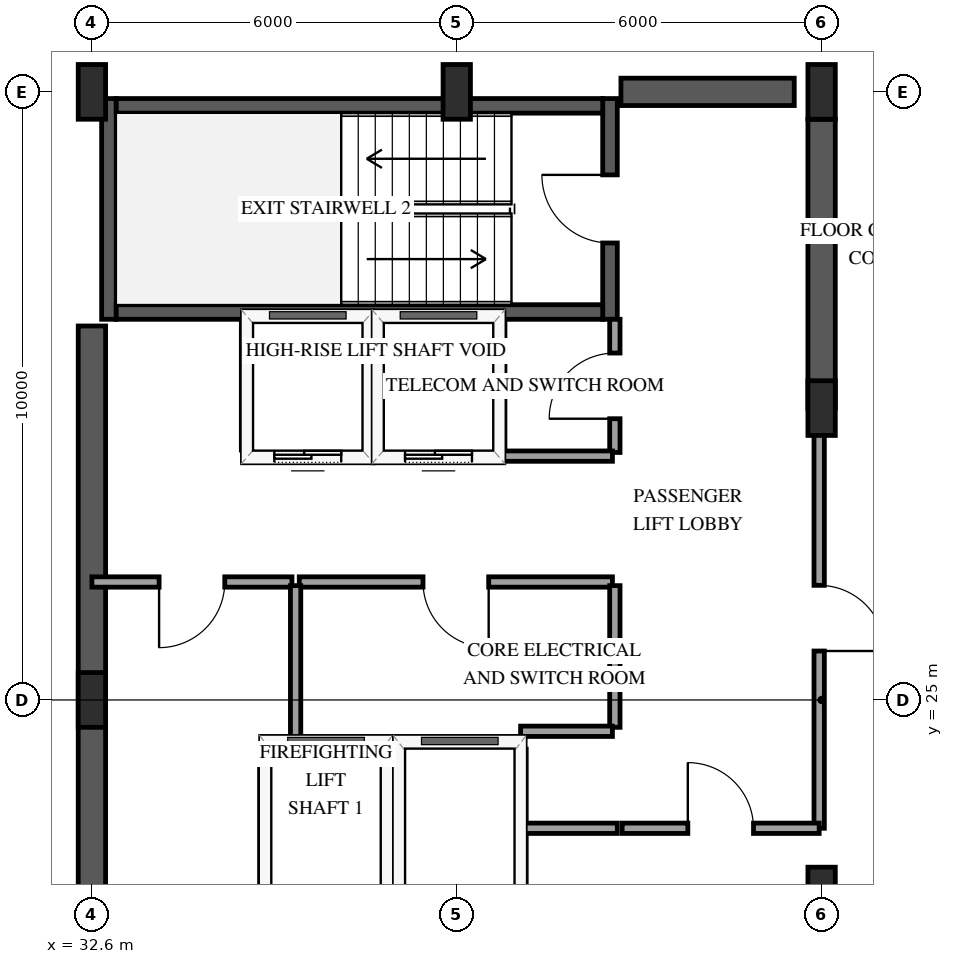
"""IFC4 building model, lengths in metres.
Left out: names, types, materials, properties, quantities, classifications, styles, units other than length and angle.
Written with IfcOpenShell. Run it as: python <this file> out.ifc"""

import sys

from ifc_helpers import new_model, si_unit, direction, frame, frame_2d, origin, origin_2d, place, context, subcontext, project, spatial, rectangle, extrude, element, fill, save


model = new_model("IFC4")
c1 = context("Model", 3, precision=1e-05, world=origin(), true_north=direction((0.0, 1.0)))
c2 = subcontext(c1, "Body", "Model", "MODEL_VIEW")
j1 = project(units=[si_unit("LENGTHUNIT", "METRE"), si_unit("PLANEANGLEUNIT", "RADIAN")], contexts=[c1])
p1 = place(None, origin())
s1 = spatial("IfcSite", under=j1, at=p1, CompositionType="ELEMENT")
p2 = place(p1, origin())
s2 = spatial("IfcBuilding", under=s1, at=p2, CompositionType="ELEMENT")
p3 = place(p2, frame((0.0, 0.0, 246.25)))
s3 = spatial("IfcBuildingStorey", under=s2, at=p3, CompositionType="ELEMENT", Elevation=246.25)
p4 = place(p3, frame((32.88, 31.26, 0.0), z_axis=(0.0, 0.0, 1.0), x_axis=(0.0, 1.0, 0.0)))
e1 = element("IfcWall", 1, at=p4, inside=s3, PredefinedType="SHEAR", context=c2, shape_type="SweptSolid", body=[
    extrude(rectangle(XDim=3.63, YDim=0.24, at=frame_2d((1.815, 0.0))), origin(), (0.0, 0.0, 1.0), 3.75),
])
p5 = place(p3, frame((41.12, 31.26, 0.0), z_axis=(0.0, 0.0, 1.0), x_axis=(0.0, 1.0, 0.0)))
e2 = element("IfcWall", 2, at=p5, inside=s3, PredefinedType="SHEAR", context=c2, shape_type="SweptSolid", body=[
    extrude(rectangle(XDim=3.63, YDim=0.24, at=frame_2d((1.815, 0.0))), origin(), (0.0, 0.0, 1.0), 3.75),
])
p6 = place(p5, frame((1.255, 0.0, 0.0)))
e3 = element("IfcOpeningElement", 3, at=p6, cuts=e2, PredefinedType="OPENING", context=c2, shape_type="SweptSolid", body=[
    extrude(rectangle(XDim=1.12, YDim=2.15, at=frame_2d((0.56, 1.075))), frame((0.0, 0.13, 0.0), z_axis=(0.0, -1.0, 0.0), x_axis=(1.0, 0.0, 0.0)), (0.0, 0.0, 1.0), 0.26),
])
for number, where, z_axis, x_axis in (
    (4, (33.0, 31.38, 0.0), (0.0, 0.0, 1.0), (1.0, 0.0, 0.0)),
    (5, (33.0, 34.77, 0.0), (0.0, 0.0, 1.0), (1.0, 0.0, 0.0)),
):
    element("IfcWall", number, at=place(p3, frame(where, z_axis=z_axis, x_axis=x_axis)), inside=s3, PredefinedType="SHEAR", context=c2, shape_type="SweptSolid", body=[
        extrude(rectangle(XDim=8.0, YDim=0.24, at=frame_2d((4.0, 0.0))), origin(), (0.0, 0.0, 1.0), 3.75),
    ])
p7 = place(p3, frame((32.6, 18.85, 0.0), z_axis=(0.0, 0.0, 1.0), x_axis=(0.0, 1.0, 0.0)))
e6 = element("IfcWall", 6, at=p7, inside=s3, PredefinedType="SHEAR", context=c2, shape_type="SweptSolid", body=[
    extrude(rectangle(XDim=12.3, YDim=0.45, at=frame_2d((6.15, 0.0))), origin(), (0.0, 0.0, 1.0), 3.75),
])
p8 = place(p3, frame((41.3, 35.0, 0.0), z_axis=(0.0, 0.0, 1.0), x_axis=(1.0, 0.0, 0.0)))
e7 = element("IfcWall", 7, at=p8, inside=s3, PredefinedType="SHEAR", context=c2, shape_type="SweptSolid", body=[
    extrude(rectangle(XDim=2.85, YDim=0.45, at=frame_2d((1.425, 0.0))), origin(), (0.0, 0.0, 1.0), 3.75),
])
p9 = place(p3, frame((44.6, 29.8, 0.0), z_axis=(0.0, 0.0, 1.0), x_axis=(0.0, 1.0, 0.0)))
e8 = element("IfcWall", 8, at=p9, inside=s3, PredefinedType="SHEAR", context=c2, shape_type="SweptSolid", body=[
    extrude(rectangle(XDim=4.75, YDim=0.45, at=frame_2d((2.375, 0.0))), origin(), (0.0, 0.0, 1.0), 3.75),
])
for number, where, z_axis, x_axis in (
    (9, (32.6, 25.0, 0.0), (0.0, 0.0, 1.0), (1.0, 0.0, 0.0)),
    (10, (32.6, 35.0, 0.0), (0.0, 0.0, 1.0), (1.0, 0.0, 0.0)),
    (11, (38.6, 35.0, 0.0), (0.0, 0.0, 1.0), (1.0, 0.0, 0.0)),
    (12, (44.6, 21.8, 0.0), (0.0, 0.0, 1.0), (1.0, 0.0, 0.0)),
    (13, (44.6, 29.8, 0.0), (0.0, 0.0, 1.0), (1.0, 0.0, 0.0)),
    (14, (44.6, 35.0, 0.0), (0.0, 0.0, 1.0), (1.0, 0.0, 0.0)),
):
    element("IfcColumn", number, at=place(p3, frame(where, z_axis=z_axis, x_axis=x_axis)), inside=s3, PredefinedType="PILASTER", context=c2, shape_type="SweptSolid", body=[
        extrude(rectangle(XDim=0.45, YDim=0.9, at=origin_2d()), origin(), (0.0, 0.0, 1.0), 3.75),
    ])
p10 = place(p3, frame((35.45, 24.3, 0.0), z_axis=(0.0, 0.0, 1.0), x_axis=(1.0, 0.0, 0.0)))
e15 = element("IfcWall", 15, at=p10, inside=s3, PredefinedType="SOLIDWALL", context=c2, shape_type="SweptSolid", body=[
    extrude(rectangle(XDim=2.0, YDim=0.185, at=frame_2d((1.0, 0.0))), origin(), (0.0, 0.0, 1.0), 3.45),
])
for number, where, z_axis, x_axis in (
    (16, (35.45, 21.81, 0.0), (0.0, 0.0, 1.0), (0.0, 1.0, 0.0)),
    (17, (37.45, 21.81, 0.0), (0.0, 0.0, 1.0), (0.0, 1.0, 0.0)),
):
    element("IfcWall", number, at=place(p3, frame(where, z_axis=z_axis, x_axis=x_axis)), inside=s3, PredefinedType="SOLIDWALL", context=c2, shape_type="SweptSolid", body=[
        extrude(rectangle(XDim=2.38, YDim=0.185, at=frame_2d((1.19, 0.0))), origin(), (0.0, 0.0, 1.0), 3.45),
    ])
p11 = place(p3, frame((37.65, 24.3, 0.0), z_axis=(0.0, 0.0, 1.0), x_axis=(1.0, 0.0, 0.0)))
e18 = element("IfcWall", 18, at=p11, inside=s3, PredefinedType="SOLIDWALL", context=c2, shape_type="SweptSolid", body=[
    extrude(rectangle(XDim=2.0, YDim=0.185, at=frame_2d((1.0, 0.0))), origin(), (0.0, 0.0, 1.0), 3.45),
])
p12 = place(p3, frame((39.65, 21.81, 0.0), z_axis=(0.0, 0.0, 1.0), x_axis=(0.0, 1.0, 0.0)))
e19 = element("IfcWall", 19, at=p12, inside=s3, PredefinedType="SOLIDWALL", context=c2, shape_type="SweptSolid", body=[
    extrude(rectangle(XDim=2.38, YDim=0.185, at=frame_2d((1.19, 0.0))), origin(), (0.0, 0.0, 1.0), 3.45),
])
p13 = place(p3, frame((35.15, 29.0, 0.0), z_axis=(0.0, 0.0, 1.0), x_axis=(1.0, 0.0, 0.0)))
e20 = element("IfcWall", 20, at=p13, inside=s3, PredefinedType="SOLIDWALL", context=c2, shape_type="SweptSolid", body=[
    extrude(rectangle(XDim=2.0, YDim=0.185, at=frame_2d((1.0, 0.0))), origin(), (0.0, 0.0, 1.0), 3.45),
])
p14 = place(p13, frame((0.45, 0.0, 0.0)))
e21 = element("IfcOpeningElement", 21, at=p14, cuts=e20, PredefinedType="OPENING", context=c2, shape_type="SweptSolid", body=[
    extrude(rectangle(XDim=1.1, YDim=2.15, at=frame_2d((0.55, 1.075))), frame((0.0, 0.103, 0.0), z_axis=(0.0, -1.0, 0.0), x_axis=(1.0, 0.0, 0.0)), (0.0, 0.0, 1.0), 0.205),
])
for number, where, z_axis, x_axis in (
    (22, (35.15, 29.11, 0.0), (0.0, 0.0, 1.0), (0.0, 1.0, 0.0)),
    (23, (37.15, 29.11, 0.0), (0.0, 0.0, 1.0), (0.0, 1.0, 0.0)),
):
    element("IfcWall", number, at=place(p3, frame(where, z_axis=z_axis, x_axis=x_axis)), inside=s3, PredefinedType="SOLIDWALL", context=c2, shape_type="SweptSolid", body=[
        extrude(rectangle(XDim=2.1, YDim=0.185, at=frame_2d((1.05, 0.0))), origin(), (0.0, 0.0, 1.0), 3.45),
    ])
p15 = place(p3, frame((37.3, 29.0, 0.0), z_axis=(0.0, 0.0, 1.0), x_axis=(1.0, 0.0, 0.0)))
e24 = element("IfcWall", 24, at=p15, inside=s3, PredefinedType="SOLIDWALL", context=c2, shape_type="SweptSolid", body=[
    extrude(rectangle(XDim=2.0, YDim=0.185, at=frame_2d((1.0, 0.0))), origin(), (0.0, 0.0, 1.0), 3.45),
])
p16 = place(p15, frame((0.45, 0.0, 0.0)))
e25 = element("IfcOpeningElement", 25, at=p16, cuts=e24, PredefinedType="OPENING", context=c2, shape_type="SweptSolid", body=[
    extrude(rectangle(XDim=1.1, YDim=2.15, at=frame_2d((0.55, 1.075))), frame((0.0, 0.103, 0.0), z_axis=(0.0, -1.0, 0.0), x_axis=(1.0, 0.0, 0.0)), (0.0, 0.0, 1.0), 0.205),
])
p17 = place(p3, frame((39.3, 29.11, 0.0), z_axis=(0.0, 0.0, 1.0), x_axis=(0.0, 1.0, 0.0)))
e26 = element("IfcWall", 26, at=p17, inside=s3, PredefinedType="SOLIDWALL", context=c2, shape_type="SweptSolid", body=[
    extrude(rectangle(XDim=2.1, YDim=0.185, at=frame_2d((1.05, 0.0))), origin(), (0.0, 0.0, 1.0), 3.45),
])
p18 = place(p3, frame((44.56, 29.8, 0.0), z_axis=(0.0, 0.0, 1.0), x_axis=(0.0, -1.0, 0.0)))
e27 = element("IfcWall", 27, at=p18, inside=s3, PredefinedType="PARTITIONING", context=c2, shape_type="SweptSolid", body=[
    extrude(rectangle(XDim=6.91, YDim=0.17, at=frame_2d((3.455, 0.0))), origin(), (0.0, 0.0, 1.0), 2.49),
])
p19 = place(p18, frame((2.915, 0.0, 0.0)))
e28 = element("IfcOpeningElement", 28, at=p19, cuts=e27, PredefinedType="OPENING", context=c2, shape_type="SweptSolid", body=[
    extrude(rectangle(XDim=1.08, YDim=2.15, at=frame_2d((0.54, 1.075))), frame((0.0, 0.095, 0.0), z_axis=(0.0, -1.0, 0.0), x_axis=(1.0, 0.0, 0.0)), (0.0, 0.0, 1.0), 0.19),
])
p20 = place(p3, frame((41.16, 26.94, 0.0), z_axis=(0.0, 0.0, 1.0), x_axis=(-1.0, 0.0, 0.0)))
e29 = element("IfcWall", 29, at=p20, inside=s3, PredefinedType="PARTITIONING", context=c2, shape_type="SweptSolid", body=[
    extrude(rectangle(XDim=5.15, YDim=0.17, at=frame_2d((2.575, 0.0))), origin(), (0.0, 0.0, 1.0), 3.45),
])
p21 = place(p20, frame((2.035, 0.0, 0.0)))
e30 = element("IfcOpeningElement", 30, at=p21, cuts=e29, PredefinedType="OPENING", context=c2, shape_type="SweptSolid", body=[
    extrude(rectangle(XDim=1.08, YDim=2.15, at=frame_2d((0.54, 1.075))), frame((0.0, 0.095, 0.0), z_axis=(0.0, -1.0, 0.0), x_axis=(1.0, 0.0, 0.0)), (0.0, 0.0, 1.0), 0.19),
])
p22 = place(p3, frame((35.89, 26.94, 0.0), z_axis=(0.0, 0.0, 1.0), x_axis=(-1.0, 0.0, 0.0)))
e31 = element("IfcWall", 31, at=p22, inside=s3, PredefinedType="PARTITIONING", context=c2, shape_type="SweptSolid", body=[
    extrude(rectangle(XDim=3.29, YDim=0.17, at=frame_2d((1.645, 0.0))), origin(), (0.0, 0.0, 1.0), 3.45),
])
p23 = place(p22, frame((1.105, 0.0, 0.0)))
e32 = element("IfcOpeningElement", 32, at=p23, cuts=e31, PredefinedType="OPENING", context=c2, shape_type="SweptSolid", body=[
    extrude(rectangle(XDim=1.08, YDim=2.15, at=frame_2d((0.54, 1.075))), frame((0.0, 0.095, 0.0), z_axis=(0.0, -1.0, 0.0), x_axis=(1.0, 0.0, 0.0)), (0.0, 0.0, 1.0), 0.19),
])
p24 = place(p3, frame((41.32, 22.89, 0.0), z_axis=(0.0, 0.0, 1.0), x_axis=(1.0, 0.0, 0.0)))
e33 = element("IfcWall", 33, at=p24, inside=s3, PredefinedType="PARTITIONING", context=c2, shape_type="SweptSolid", body=[
    extrude(rectangle(XDim=3.24, YDim=0.17, at=frame_2d((1.62, 0.0))), origin(), (0.0, 0.0, 1.0), 3.45),
])
p25 = place(p24, frame((1.08, 0.0, 0.0)))
e34 = element("IfcOpeningElement", 34, at=p25, cuts=e33, PredefinedType="OPENING", context=c2, shape_type="SweptSolid", body=[
    extrude(rectangle(XDim=1.08, YDim=2.15, at=frame_2d((0.54, 1.075))), frame((0.0, 0.095, 0.0), z_axis=(0.0, -1.0, 0.0), x_axis=(1.0, 0.0, 0.0)), (0.0, 0.0, 1.0), 0.19),
])
p26 = place(p3, frame((35.95, 26.88, 0.0), z_axis=(0.0, 0.0, 1.0), x_axis=(0.0, -1.0, 0.0)))
e35 = element("IfcWall", 35, at=p26, inside=s3, PredefinedType="PARTITIONING", context=c2, shape_type="SweptSolid", body=[
    extrude(rectangle(XDim=2.58, YDim=0.17, at=frame_2d((1.29, 0.0))), origin(), (0.0, 0.0, 1.0), 3.45),
])
p27 = place(p3, frame((41.2, 24.55, 0.0), z_axis=(0.0, 0.0, 1.0), x_axis=(0.0, 1.0, 0.0)))
e36 = element("IfcWall", 36, at=p27, inside=s3, PredefinedType="PARTITIONING", context=c2, shape_type="SweptSolid", body=[
    extrude(rectangle(XDim=2.33, YDim=0.17, at=frame_2d((1.165, 0.0))), origin(), (0.0, 0.0, 1.0), 3.45),
])
p28 = place(p3, frame((41.2, 29.07, 0.0), z_axis=(0.0, 0.0, 1.0), x_axis=(0.0, 1.0, 0.0)))
e37 = element("IfcWall", 37, at=p28, inside=s3, PredefinedType="PARTITIONING", context=c2, shape_type="SweptSolid", body=[
    extrude(rectangle(XDim=2.19, YDim=0.17, at=frame_2d((1.095, 0.0))), origin(), (0.0, 0.0, 1.0), 3.45),
])
p29 = place(p28, frame((0.555, 0.0, 0.0)))
e38 = element("IfcOpeningElement", 38, at=p29, cuts=e37, PredefinedType="OPENING", context=c2, shape_type="SweptSolid", body=[
    extrude(rectangle(XDim=1.08, YDim=2.15, at=frame_2d((0.54, 1.075))), frame((0.0, 0.095, 0.0), z_axis=(0.0, -1.0, 0.0), x_axis=(1.0, 0.0, 0.0)), (0.0, 0.0, 1.0), 0.19),
])
p30 = place(p3, frame((39.3, 29.01, 0.0), z_axis=(0.0, 0.0, 1.0), x_axis=(1.0, 0.0, 0.0)))
e39 = element("IfcWall", 39, at=p30, inside=s3, PredefinedType="PARTITIONING", context=c2, shape_type="SweptSolid", body=[
    extrude(rectangle(XDim=1.86, YDim=0.17, at=frame_2d((0.93, 0.0))), origin(), (0.0, 0.0, 1.0), 3.45),
])
p31 = place(p3, frame((39.72, 22.89, 0.0), z_axis=(0.0, 0.0, 1.0), x_axis=(1.0, 0.0, 0.0)))
e40 = element("IfcWall", 40, at=p31, inside=s3, PredefinedType="PARTITIONING", context=c2, shape_type="SweptSolid", body=[
    extrude(rectangle(XDim=1.52, YDim=0.17, at=frame_2d((0.76, 0.0))), origin(), (0.0, 0.0, 1.0), 3.45),
])
p32 = place(p3, frame((39.65, 24.485, 0.0), z_axis=(0.0, 0.0, 1.0), x_axis=(1.0, 0.0, 0.0)))
e41 = element("IfcWall", 41, at=p32, inside=s3, PredefinedType="PARTITIONING", context=c2, shape_type="SweptSolid", body=[
    extrude(rectangle(XDim=1.51, YDim=0.17, at=frame_2d((0.755, 0.0))), origin(), (0.0, 0.0, 1.0), 3.45),
])
p33 = place(p14, origin())
e42 = element("IfcDoor", 42, at=p33, inside=s3, OperationType="SLIDING_TO_LEFT", PredefinedType="DOOR", context=c2, shape_type="SweptSolid", body=[
    extrude(rectangle(XDim=1.1, YDim=2.15, at=frame_2d((0.55, 1.075))), frame((0.0, 0.025, 0.0), z_axis=(0.0, -1.0, 0.0), x_axis=(1.0, 0.0, 0.0)), (0.0, 0.0, 1.0), 0.05),
])
fill(e21, e42)
p34 = place(p16, origin())
e43 = element("IfcDoor", 43, at=p34, inside=s3, OperationType="SLIDING_TO_LEFT", PredefinedType="DOOR", context=c2, shape_type="SweptSolid", body=[
    extrude(rectangle(XDim=1.1, YDim=2.15, at=frame_2d((0.55, 1.075))), frame((0.0, 0.025, 0.0), z_axis=(0.0, -1.0, 0.0), x_axis=(1.0, 0.0, 0.0)), (0.0, 0.0, 1.0), 0.05),
])
fill(e25, e43)
p35 = place(p6, origin())
e44 = element("IfcDoor", 44, at=p35, inside=s3, OperationType="SINGLE_SWING_RIGHT", PredefinedType="DOOR", context=c2, shape_type="SweptSolid", body=[
    extrude(rectangle(XDim=1.12, YDim=2.15, at=frame_2d((0.56, 1.075))), frame((0.0, 0.025, 0.0), z_axis=(0.0, -1.0, 0.0), x_axis=(1.0, 0.0, 0.0)), (0.0, 0.0, 1.0), 0.05),
])
fill(e3, e44)
p36 = place(p19, origin())
e45 = element("IfcDoor", 45, at=p36, inside=s3, OperationType="SINGLE_SWING_RIGHT", PredefinedType="DOOR", context=c2, shape_type="SweptSolid", body=[
    extrude(rectangle(XDim=1.08, YDim=2.15, at=frame_2d((0.54, 1.075))), frame((0.0, 0.025, 0.0), z_axis=(0.0, -1.0, 0.0), x_axis=(1.0, 0.0, 0.0)), (0.0, 0.0, 1.0), 0.05),
])
fill(e28, e45)
p37 = place(p21, origin())
e46 = element("IfcDoor", 46, at=p37, inside=s3, OperationType="SINGLE_SWING_LEFT", PredefinedType="DOOR", context=c2, shape_type="SweptSolid", body=[
    extrude(rectangle(XDim=1.08, YDim=2.15, at=frame_2d((0.54, 1.075))), frame((0.0, 0.025, 0.0), z_axis=(0.0, -1.0, 0.0), x_axis=(1.0, 0.0, 0.0)), (0.0, 0.0, 1.0), 0.05),
])
fill(e30, e46)
p38 = place(p23, origin())
e47 = element("IfcDoor", 47, at=p38, inside=s3, OperationType="SINGLE_SWING_RIGHT", PredefinedType="DOOR", context=c2, shape_type="SweptSolid", body=[
    extrude(rectangle(XDim=1.08, YDim=2.15, at=frame_2d((0.54, 1.075))), frame((0.0, 0.025, 0.0), z_axis=(0.0, -1.0, 0.0), x_axis=(1.0, 0.0, 0.0)), (0.0, 0.0, 1.0), 0.05),
])
fill(e32, e47)
p39 = place(p25, origin())
e48 = element("IfcDoor", 48, at=p39, inside=s3, OperationType="SINGLE_SWING_LEFT", PredefinedType="DOOR", context=c2, shape_type="SweptSolid", body=[
    extrude(rectangle(XDim=1.08, YDim=2.15, at=frame_2d((0.54, 1.075))), frame((0.0, 0.025, 0.0), z_axis=(0.0, -1.0, 0.0), x_axis=(1.0, 0.0, 0.0)), (0.0, 0.0, 1.0), 0.05),
])
fill(e34, e48)
p40 = place(p29, origin())
e49 = element("IfcDoor", 49, at=p40, inside=s3, OperationType="SINGLE_SWING_LEFT", PredefinedType="DOOR", context=c2, shape_type="SweptSolid", body=[
    extrude(rectangle(XDim=1.08, YDim=2.15, at=frame_2d((0.54, 1.075))), frame((0.0, 0.025, 0.0), z_axis=(0.0, -1.0, 0.0), x_axis=(1.0, 0.0, 0.0)), (0.0, 0.0, 1.0), 0.05),
])
fill(e38, e49)
save(model, sys.argv[1])
